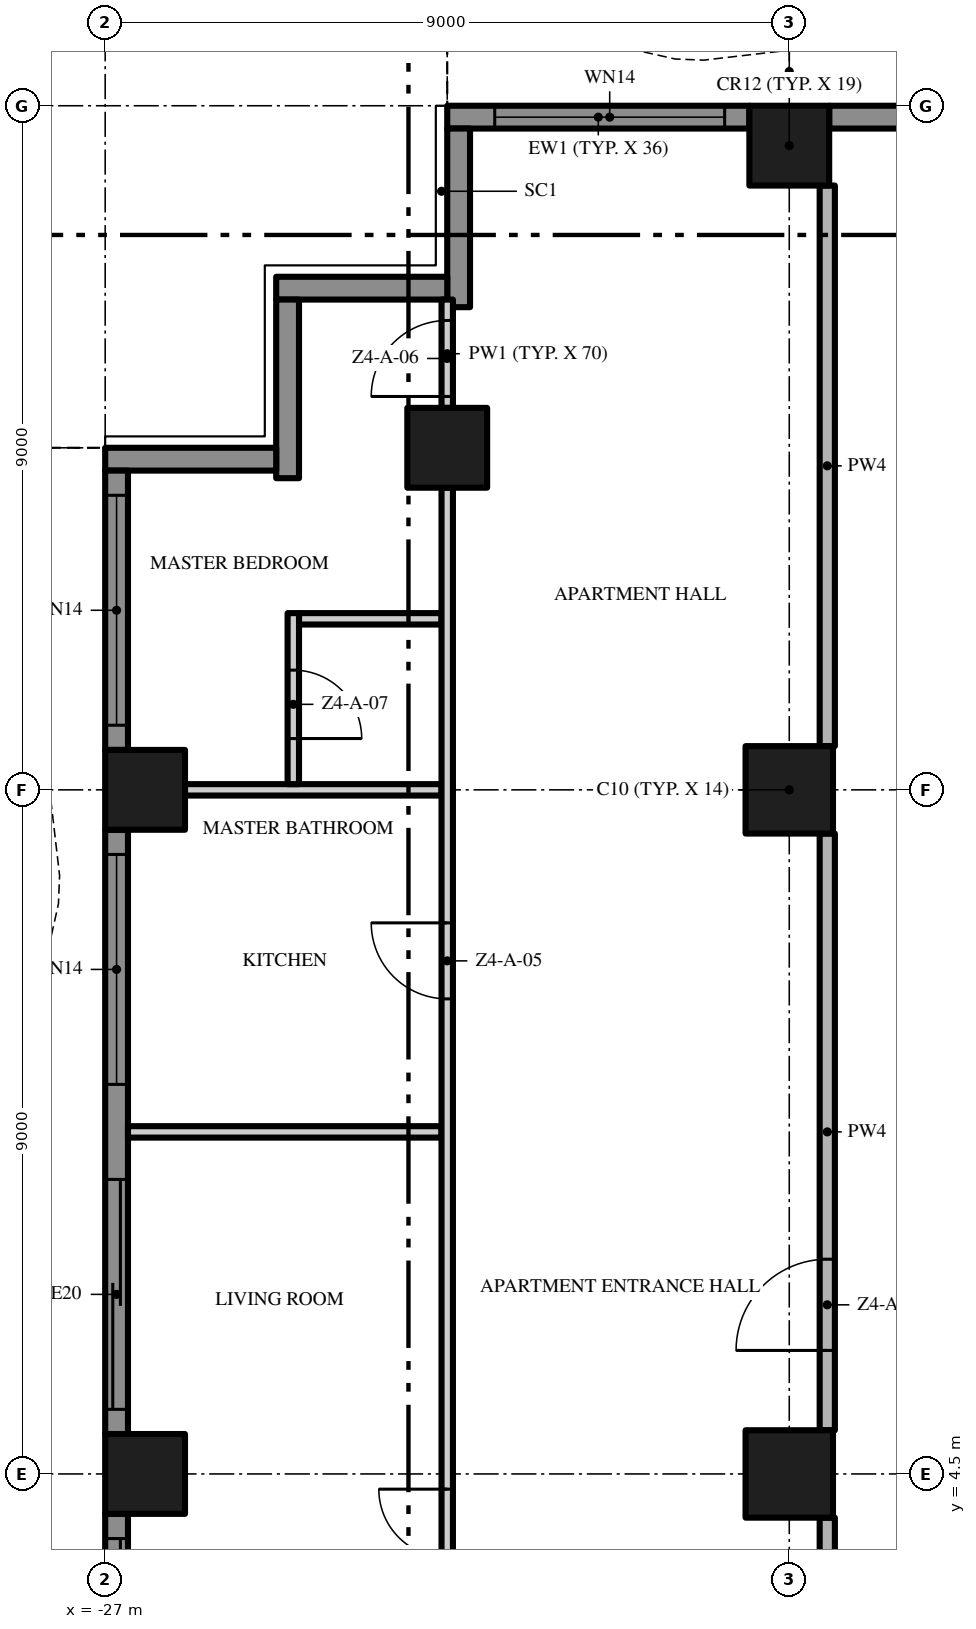
"""IFC4 building model, lengths in metres.
Left out: names, types, materials, properties, quantities, classifications, styles, units other than length and angle.
Written with IfcOpenShell. Run it as: python <this file> out.ifc"""

import sys

from ifc_helpers import new_model, si_unit, direction, frame, frame_2d, origin, origin_2d, place, context, subcontext, project, spatial, polyline, rectangle, outline, extrude, element, fill, save


model = new_model("IFC4")
c1 = context("Model", 3, precision=1e-05, world=origin(), true_north=direction((0.0, 1.0)))
c2 = subcontext(c1, "Body", "Model", "MODEL_VIEW")
j1 = project(units=[si_unit("LENGTHUNIT", "METRE"), si_unit("PLANEANGLEUNIT", "RADIAN")], contexts=[c1])
p1 = place(None, origin())
s1 = spatial("IfcSite", under=j1, at=p1, CompositionType="ELEMENT")
p2 = place(p1, origin())
s2 = spatial("IfcBuilding", under=s1, at=p2, CompositionType="ELEMENT")
p3 = place(p2, frame((0.0, 0.0, 192.0)))
s3 = spatial("IfcBuildingStorey", under=s2, at=p3, CompositionType="ELEMENT", Elevation=192.0)
p4 = place(p3, frame((-18.0, 13.5, 0.0), z_axis=(0.0, 0.0, 1.0), x_axis=(1.0, 0.0, 0.0)))
e1 = element("IfcColumn", 1, at=p4, inside=s3, PredefinedType="COLUMN", context=c2, shape_type="SweptSolid", body=[
    extrude(rectangle(XDim=1.15, YDim=1.15, at=origin_2d()), origin(), (0.0, 0.0, 1.0), 3.5),
])
p5 = place(p3, frame((-18.0, 21.975, 0.0), z_axis=(0.0, 0.0, 1.0), x_axis=(1.0, 0.0, 0.0)))
e2 = element("IfcColumn", 2, at=p5, inside=s3, PredefinedType="COLUMN", context=c2, shape_type="SweptSolid", body=[
    extrude(rectangle(XDim=1.05, YDim=1.05, at=origin_2d()), origin(), (0.0, 0.0, 1.0), 3.5),
])
p6 = place(p3, frame((-18.0, 4.5, 0.0), z_axis=(0.0, 0.0, 1.0), x_axis=(1.0, 0.0, 0.0)))
e3 = element("IfcColumn", 3, at=p6, inside=s3, PredefinedType="COLUMN", context=c2, shape_type="SweptSolid", body=[
    extrude(rectangle(XDim=1.15, YDim=1.15, at=origin_2d()), origin(), (0.0, 0.0, 1.0), 3.5),
])
for number, where, z_axis, x_axis in (
    (4, (-26.475, 13.5, 0.0), (0.0, 0.0, 1.0), (1.0, 0.0, 0.0)),
    (5, (-22.5, 18.0, 0.0), (0.0, 0.0, 1.0), (1.0, 0.0, 0.0)),
    (6, (-26.475, 4.5, 0.0), (0.0, 0.0, 1.0), (1.0, 0.0, 0.0)),
):
    element("IfcColumn", number, at=place(p3, frame(where, z_axis=z_axis, x_axis=x_axis)), inside=s3, PredefinedType="COLUMN", context=c2, shape_type="SweptSolid", body=[
        extrude(rectangle(XDim=1.05, YDim=1.05, at=origin_2d()), origin(), (0.0, 0.0, 1.0), 3.5),
    ])
p7 = place(p3, frame((-17.475, 22.35, 0.0), z_axis=(0.0, 0.0, 1.0), x_axis=(1.0, 0.0, 0.0)))
e7 = element("IfcWall", 7, at=p7, inside=s3, PredefinedType="SOLIDWALL", context=c2, shape_type="SweptSolid", body=[
    extrude(rectangle(XDim=3.975, YDim=0.3, at=frame_2d((1.988, 0.0))), origin(), (0.0, 0.0, 1.0), 3.5),
])
p8 = place(p7, frame((0.95, 0.0, 0.0)))
e8 = element("IfcOpeningElement", 8, at=p8, cuts=e7, PredefinedType="OPENING", context=c2, shape_type="SweptSolid", body=[
    extrude(rectangle(XDim=2.4, YDim=2.4, at=frame_2d((1.2, 1.2))), frame((0.0, 0.16, 0.0), z_axis=(0.0, -1.0, 0.0), x_axis=(1.0, 0.0, 0.0)), (0.0, 0.0, 1.0), 0.32),
])
p9 = place(p3, frame((-22.5, 22.35, 0.0), z_axis=(0.0, 0.0, 1.0), x_axis=(1.0, 0.0, 0.0)))
e9 = element("IfcWall", 9, at=p9, inside=s3, PredefinedType="SOLIDWALL", context=c2, shape_type="SweptSolid", body=[
    extrude(rectangle(XDim=3.975, YDim=0.3, at=frame_2d((1.988, 0.0))), origin(), (0.0, 0.0, 1.0), 3.5),
])
p10 = place(p9, frame((0.625, 0.0, 0.45)))
e10 = element("IfcOpeningElement", 10, at=p10, cuts=e9, PredefinedType="OPENING", context=c2, shape_type="SweptSolid", body=[
    extrude(rectangle(XDim=3.025, YDim=2.65, at=frame_2d((1.512, 1.325))), frame((0.0, 0.16, 0.0), z_axis=(0.0, -1.0, 0.0), x_axis=(1.0, 0.0, 0.0)), (0.0, 0.0, 1.0), 0.32),
])
p11 = place(p3, frame((-22.35, 19.85, 0.0), z_axis=(0.0, 0.0, 1.0), x_axis=(0.0, 1.0, 0.0)))
e11 = element("IfcWall", 11, at=p11, inside=s3, PredefinedType="SOLIDWALL", context=c2, shape_type="SweptSolid", body=[
    extrude(rectangle(XDim=2.35, YDim=0.3, at=frame_2d((1.175, 0.0))), origin(), (0.0, 0.0, 1.0), 3.5),
])
p12 = place(p3, frame((-24.75, 20.1, 0.0), z_axis=(0.0, 0.0, 1.0), x_axis=(1.0, 0.0, 0.0)))
e12 = element("IfcWall", 12, at=p12, inside=s3, PredefinedType="SOLIDWALL", context=c2, shape_type="SweptSolid", body=[
    extrude(rectangle(XDim=2.25, YDim=0.3, at=frame_2d((1.125, 0.0))), origin(), (0.0, 0.0, 1.0), 3.5),
])
p13 = place(p3, frame((-24.6, 17.6, 0.0), z_axis=(0.0, 0.0, 1.0), x_axis=(0.0, 1.0, 0.0)))
e13 = element("IfcWall", 13, at=p13, inside=s3, PredefinedType="SOLIDWALL", context=c2, shape_type="SweptSolid", body=[
    extrude(rectangle(XDim=2.35, YDim=0.3, at=frame_2d((1.175, 0.0))), origin(), (0.0, 0.0, 1.0), 3.5),
])
p14 = place(p3, frame((-27.0, 17.85, 0.0), z_axis=(0.0, 0.0, 1.0), x_axis=(1.0, 0.0, 0.0)))
e14 = element("IfcWall", 14, at=p14, inside=s3, PredefinedType="SOLIDWALL", context=c2, shape_type="SweptSolid", body=[
    extrude(rectangle(XDim=2.25, YDim=0.3, at=frame_2d((1.125, 0.0))), origin(), (0.0, 0.0, 1.0), 3.5),
])
p15 = place(p3, frame((-26.85, 14.025, 0.0), z_axis=(0.0, 0.0, 1.0), x_axis=(0.0, 1.0, 0.0)))
e15 = element("IfcWall", 15, at=p15, inside=s3, PredefinedType="SOLIDWALL", context=c2, shape_type="SweptSolid", body=[
    extrude(rectangle(XDim=3.675, YDim=0.3, at=frame_2d((1.837, 0.0))), origin(), (0.0, 0.0, 1.0), 3.5),
])
p16 = place(p15, frame((0.325, 0.0, 0.45)))
e16 = element("IfcOpeningElement", 16, at=p16, cuts=e15, PredefinedType="OPENING", context=c2, shape_type="SweptSolid", body=[
    extrude(rectangle(XDim=3.025, YDim=2.65, at=frame_2d((1.512, 1.325))), frame((0.0, 0.16, 0.0), z_axis=(0.0, -1.0, 0.0), x_axis=(1.0, 0.0, 0.0)), (0.0, 0.0, 1.0), 0.32),
])
p17 = place(p3, frame((-26.85, 5.025, 0.0), z_axis=(0.0, 0.0, 1.0), x_axis=(0.0, 1.0, 0.0)))
e17 = element("IfcWall", 17, at=p17, inside=s3, PredefinedType="SOLIDWALL", context=c2, shape_type="SweptSolid", body=[
    extrude(rectangle(XDim=7.95, YDim=0.3, at=frame_2d((3.975, 0.0))), origin(), (0.0, 0.0, 1.0), 3.5),
])
p18 = place(p17, frame((4.6, 0.0, 0.45)))
e18 = element("IfcOpeningElement", 18, at=p18, cuts=e17, PredefinedType="OPENING", context=c2, shape_type="SweptSolid", body=[
    extrude(rectangle(XDim=3.025, YDim=2.65, at=frame_2d((1.512, 1.325))), frame((0.0, 0.16, 0.0), z_axis=(0.0, -1.0, 0.0), x_axis=(1.0, 0.0, 0.0)), (0.0, 0.0, 1.0), 0.32),
])
p19 = place(p17, frame((0.325, 0.0, 0.0)))
e19 = element("IfcOpeningElement", 19, at=p19, cuts=e17, PredefinedType="OPENING", context=c2, shape_type="SweptSolid", body=[
    extrude(rectangle(XDim=3.025, YDim=2.4, at=frame_2d((1.512, 1.2))), frame((0.0, 0.16, 0.0), z_axis=(0.0, -1.0, 0.0), x_axis=(1.0, 0.0, 0.0)), (0.0, 0.0, 1.0), 0.32),
])
p20 = place(p3, frame((-26.85, -3.975, 0.0), z_axis=(0.0, 0.0, 1.0), x_axis=(0.0, 1.0, 0.0)))
e20 = element("IfcWall", 20, at=p20, inside=s3, PredefinedType="SOLIDWALL", context=c2, shape_type="SweptSolid", body=[
    extrude(rectangle(XDim=7.95, YDim=0.3, at=frame_2d((3.975, 0.0))), origin(), (0.0, 0.0, 1.0), 3.5),
])
p21 = place(p20, frame((4.6, 0.0, 0.0)))
e21 = element("IfcOpeningElement", 21, at=p21, cuts=e20, PredefinedType="OPENING", context=c2, shape_type="SweptSolid", body=[
    extrude(rectangle(XDim=3.025, YDim=2.4, at=frame_2d((1.512, 1.2))), frame((0.0, 0.16, 0.0), z_axis=(0.0, -1.0, 0.0), x_axis=(1.0, 0.0, 0.0)), (0.0, 0.0, 1.0), 0.32),
])
p22 = place(p20, frame((0.325, 0.0, 0.45)))
e22 = element("IfcOpeningElement", 22, at=p22, cuts=e20, PredefinedType="OPENING", context=c2, shape_type="SweptSolid", body=[
    extrude(rectangle(XDim=3.025, YDim=2.65, at=frame_2d((1.512, 1.325))), frame((0.0, 0.16, 0.0), z_axis=(0.0, -1.0, 0.0), x_axis=(1.0, 0.0, 0.0)), (0.0, 0.0, 1.0), 0.32),
])
p23 = place(p3, origin())
e23 = element("IfcWall", 23, at=p23, inside=s3, PredefinedType="USERDEFINED", context=c2, shape_type="SweptSolid", body=[
    extrude(outline(polyline([(-13.5, 25.149), (-15.0, 24.488), (-16.5, 23.755), (-18.0, 23.231), (-19.125, 23.1), (-19.5, 23.115), (-21.0, 23.451), (-22.5, 24.112), (-22.601, 23.883), (-21.079, 23.213), (-19.533, 22.866), (-19.115, 22.849), (-17.944, 22.986), (-16.404, 23.524), (-14.895, 24.261), (-13.399, 24.92), (-13.5, 25.149)])), origin(), (0.0, 0.0, 1.0), 0.9),
])
p24 = place(p3, origin())
e24 = element("IfcWall", 24, at=p24, inside=s3, PredefinedType="USERDEFINED", context=c2, shape_type="SweptSolid", body=[
    extrude(outline(polyline([(-29.649, 18.0), (-28.988, 16.5), (-28.255, 15.0), (-27.731, 13.5), (-27.6, 12.375), (-27.615, 12.0), (-27.951, 10.5), (-28.612, 9.0), (-29.345, 7.5), (-29.869, 6.0), (-30.0, 4.875), (-29.985, 4.5), (-29.649, 3.0), (-28.988, 1.5), (-28.255, 0.0), (-27.731, -1.5), (-27.6, -2.625), (-27.615, -3.0), (-27.951, -4.5), (-28.612, -6.0), (-29.345, -7.5), (-29.869, -9.0), (-30.0, -10.125), (-29.985, -10.5), (-29.649, -12.0), (-28.988, -13.5), (-28.255, -15.0), (-27.731, -16.5), (-27.6, -17.625), (-27.615, -18.0), (-27.365, -18.01), (-27.349, -17.615), (-27.486, -16.444), (-28.024, -14.904), (-28.761, -13.395), (-29.41, -11.921), (-29.736, -10.467), (-29.749, -10.135), (-29.624, -9.056), (-29.114, -7.596), (-28.385, -6.105), (-27.713, -4.579), (-27.366, -3.033), (-27.349, -2.615), (-27.486, -1.444), (-28.024, 0.096), (-28.761, 1.605), (-29.41, 3.079), (-29.736, 4.533), (-29.749, 4.865), (-29.624, 5.944), (-29.114, 7.404), (-28.385, 8.895), (-27.713, 10.421), (-27.366, 11.967), (-27.349, 12.385), (-27.486, 13.556), (-28.024, 15.096), (-28.761, 16.605), (-29.42, 18.101), (-29.649, 18.0)])), origin(), (0.0, 0.0, 1.0), 0.9),
])
p25 = place(p3, frame((-26.7, 9.0, 0.0), z_axis=(0.0, 0.0, 1.0), x_axis=(1.0, 0.0, 0.0)))
e25 = element("IfcWall", 25, at=p25, inside=s3, PredefinedType="PARTITIONING", context=c2, shape_type="SweptSolid", body=[
    extrude(rectangle(XDim=4.125, YDim=0.15, at=frame_2d((2.062, 0.0))), origin(), (0.0, 0.0, 1.0), 3.5),
])
p26 = place(p3, frame((-25.95, 13.5, 0.0), z_axis=(0.0, 0.0, 1.0), x_axis=(1.0, 0.0, 0.0)))
e26 = element("IfcWall", 26, at=p26, inside=s3, PredefinedType="PARTITIONING", context=c2, shape_type="SweptSolid", body=[
    extrude(rectangle(XDim=3.375, YDim=0.15, at=frame_2d((1.688, 0.0))), origin(), (0.0, 0.0, 1.0), 3.5),
])
p27 = place(p3, frame((-24.45, 15.75, 0.0), z_axis=(0.0, 0.0, 1.0), x_axis=(1.0, 0.0, 0.0)))
e27 = element("IfcWall", 27, at=p27, inside=s3, PredefinedType="PARTITIONING", context=c2, shape_type="SweptSolid", body=[
    extrude(rectangle(XDim=1.875, YDim=0.15, at=frame_2d((0.938, 0.0))), origin(), (0.0, 0.0, 1.0), 3.5),
])
p28 = place(p3, frame((-24.525, 15.825, 0.0), z_axis=(0.0, 0.0, 1.0), x_axis=(0.0, -1.0, 0.0)))
e28 = element("IfcWall", 28, at=p28, inside=s3, PredefinedType="PARTITIONING", context=c2, shape_type="SweptSolid", body=[
    extrude(rectangle(XDim=2.25, YDim=0.15, at=frame_2d((1.125, 0.0))), origin(), (0.0, 0.0, 1.0), 3.5),
])
p29 = place(p28, frame((0.75, 0.0, 0.0)))
e29 = element("IfcOpeningElement", 29, at=p29, cuts=e28, PredefinedType="OPENING", context=c2, shape_type="SweptSolid", body=[
    extrude(rectangle(XDim=0.9, YDim=2.1, at=frame_2d((0.45, 1.05))), frame((0.0, 0.085, 0.0), z_axis=(0.0, -1.0, 0.0), x_axis=(1.0, 0.0, 0.0)), (0.0, 0.0, 1.0), 0.17),
])
p30 = place(p3, frame((-22.5, 0.1, 0.0), z_axis=(0.0, 0.0, 1.0), x_axis=(0.0, 1.0, 0.0)))
e30 = element("IfcWall", 30, at=p30, inside=s3, PredefinedType="PARTITIONING", context=c2, shape_type="SweptSolid", body=[
    extrude(rectangle(XDim=17.375, YDim=0.15, at=frame_2d((8.688, 0.0))), origin(), (0.0, 0.0, 1.0), 3.5),
])
p31 = place(p30, frame((2.4, 0.0, 0.0)))
e31 = element("IfcOpeningElement", 31, at=p31, cuts=e30, PredefinedType="OPENING", context=c2, shape_type="SweptSolid", body=[
    extrude(rectangle(XDim=1.8, YDim=2.4, at=frame_2d((0.9, 1.2))), frame((0.0, 0.085, 0.0), z_axis=(0.0, -1.0, 0.0), x_axis=(1.0, 0.0, 0.0)), (0.0, 0.0, 1.0), 0.17),
])
p32 = place(p30, frame((10.65, 0.0, 0.0)))
e32 = element("IfcOpeningElement", 32, at=p32, cuts=e30, PredefinedType="OPENING", context=c2, shape_type="SweptSolid", body=[
    extrude(rectangle(XDim=1.0, YDim=2.4, at=frame_2d((0.5, 1.2))), frame((0.0, 0.085, 0.0), z_axis=(0.0, -1.0, 0.0), x_axis=(1.0, 0.0, 0.0)), (0.0, 0.0, 1.0), 0.17),
])
p33 = place(p3, frame((-22.5, 18.525, 0.0), z_axis=(0.0, 0.0, 1.0), x_axis=(0.0, 1.0, 0.0)))
e33 = element("IfcWall", 33, at=p33, inside=s3, PredefinedType="PARTITIONING", context=c2, shape_type="SweptSolid", body=[
    extrude(rectangle(XDim=1.425, YDim=0.15, at=frame_2d((0.713, 0.0))), origin(), (0.0, 0.0, 1.0), 3.5),
])
p34 = place(p33, frame((0.15, 0.0, 0.0)))
e34 = element("IfcOpeningElement", 34, at=p34, cuts=e33, PredefinedType="OPENING", context=c2, shape_type="SweptSolid", body=[
    extrude(rectangle(XDim=1.0, YDim=2.4, at=frame_2d((0.5, 1.2))), frame((0.0, 0.085, 0.0), z_axis=(0.0, -1.0, 0.0), x_axis=(1.0, 0.0, 0.0)), (0.0, 0.0, 1.0), 0.17),
])
p35 = place(p3, frame((-17.5, -0.2, 0.0), z_axis=(0.0, 0.0, 1.0), x_axis=(0.0, 1.0, 0.0)))
e35 = element("IfcWall", 35, at=p35, inside=s3, PredefinedType="PARTITIONING", context=c2, shape_type="SweptSolid", body=[
    extrude(rectangle(XDim=4.125, YDim=0.2, at=frame_2d((2.062, 0.0))), origin(), (0.0, 0.0, 1.0), 3.5),
])
p36 = place(p3, frame((-17.5, 5.075, 0.0), z_axis=(0.0, 0.0, 1.0), x_axis=(0.0, 1.0, 0.0)))
e36 = element("IfcWall", 36, at=p36, inside=s3, PredefinedType="PARTITIONING", context=c2, shape_type="SweptSolid", body=[
    extrude(rectangle(XDim=7.85, YDim=0.2, at=frame_2d((3.925, 0.0))), origin(), (0.0, 0.0, 1.0), 3.5),
])
p37 = place(p36, frame((1.05, 0.0, 0.0)))
e37 = element("IfcOpeningElement", 37, at=p37, cuts=e36, PredefinedType="OPENING", context=c2, shape_type="SweptSolid", body=[
    extrude(rectangle(XDim=1.2, YDim=2.4, at=frame_2d((0.6, 1.2))), frame((0.0, 0.11, 0.0), z_axis=(0.0, -1.0, 0.0), x_axis=(1.0, 0.0, 0.0)), (0.0, 0.0, 1.0), 0.22),
])
p38 = place(p3, frame((-17.5, 14.075, 0.0), z_axis=(0.0, 0.0, 1.0), x_axis=(0.0, 1.0, 0.0)))
e38 = element("IfcWall", 38, at=p38, inside=s3, PredefinedType="PARTITIONING", context=c2, shape_type="SweptSolid", body=[
    extrude(rectangle(XDim=7.375, YDim=0.2, at=frame_2d((3.688, 0.0))), origin(), (0.0, 0.0, 1.0), 3.5),
])
p39 = place(p10, origin())
e39 = element("IfcWindow", 39, at=p39, inside=s3, PartitioningType="SINGLE_PANEL", PredefinedType="WINDOW", context=c2, shape_type="SweptSolid", body=[
    extrude(rectangle(XDim=3.025, YDim=2.65, at=frame_2d((1.512, 1.325))), frame((0.0, 0.03, 0.0), z_axis=(0.0, -1.0, 0.0), x_axis=(1.0, 0.0, 0.0)), (0.0, 0.0, 1.0), 0.06),
])
fill(e10, e39)
p40 = place(p16, origin())
e40 = element("IfcWindow", 40, at=p40, inside=s3, PartitioningType="SINGLE_PANEL", PredefinedType="WINDOW", context=c2, shape_type="SweptSolid", body=[
    extrude(rectangle(XDim=3.025, YDim=2.65, at=frame_2d((1.512, 1.325))), frame((0.0, 0.03, 0.0), z_axis=(0.0, -1.0, 0.0), x_axis=(1.0, 0.0, 0.0)), (0.0, 0.0, 1.0), 0.06),
])
fill(e16, e40)
p41 = place(p18, origin())
e41 = element("IfcWindow", 41, at=p41, inside=s3, PartitioningType="SINGLE_PANEL", PredefinedType="WINDOW", context=c2, shape_type="SweptSolid", body=[
    extrude(rectangle(XDim=3.025, YDim=2.65, at=frame_2d((1.512, 1.325))), frame((0.0, 0.03, 0.0), z_axis=(0.0, -1.0, 0.0), x_axis=(1.0, 0.0, 0.0)), (0.0, 0.0, 1.0), 0.06),
])
fill(e18, e41)
p42 = place(p19, origin())
e42 = element("IfcDoor", 42, at=p42, inside=s3, OperationType="SINGLE_SWING_LEFT", PredefinedType="DOOR", context=c2, shape_type="SweptSolid", body=[
    extrude(rectangle(XDim=3.025, YDim=2.4, at=frame_2d((1.512, 1.2))), frame((0.0, 0.025, 0.0), z_axis=(0.0, -1.0, 0.0), x_axis=(1.0, 0.0, 0.0)), (0.0, 0.0, 1.0), 0.05),
])
fill(e19, e42)
p43 = place(p21, origin())
e43 = element("IfcDoor", 43, at=p43, inside=s3, OperationType="SINGLE_SWING_LEFT", PredefinedType="DOOR", context=c2, shape_type="SweptSolid", body=[
    extrude(rectangle(XDim=3.025, YDim=2.4, at=frame_2d((1.512, 1.2))), frame((0.0, 0.025, 0.0), z_axis=(0.0, -1.0, 0.0), x_axis=(1.0, 0.0, 0.0)), (0.0, 0.0, 1.0), 0.05),
])
fill(e21, e43)
p44 = place(p37, origin())
e44 = element("IfcDoor", 44, at=p44, inside=s3, OperationType="SINGLE_SWING_LEFT", PredefinedType="DOOR", context=c2, shape_type="SweptSolid", body=[
    extrude(rectangle(XDim=1.2, YDim=2.4, at=frame_2d((0.6, 1.2))), frame((0.0, 0.025, 0.0), z_axis=(0.0, -1.0, 0.0), x_axis=(1.0, 0.0, 0.0)), (0.0, 0.0, 1.0), 0.05),
])
fill(e37, e44)
p45 = place(p31, origin())
e45 = element("IfcDoor", 45, at=p45, inside=s3, OperationType="DOUBLE_DOOR_SINGLE_SWING", PredefinedType="DOOR", context=c2, shape_type="SweptSolid", body=[
    extrude(rectangle(XDim=1.8, YDim=2.4, at=frame_2d((0.9, 1.2))), frame((0.0, 0.025, 0.0), z_axis=(0.0, -1.0, 0.0), x_axis=(1.0, 0.0, 0.0)), (0.0, 0.0, 1.0), 0.05),
])
fill(e31, e45)
p46 = place(p32, origin())
e46 = element("IfcDoor", 46, at=p46, inside=s3, OperationType="SINGLE_SWING_RIGHT", PredefinedType="DOOR", context=c2, shape_type="SweptSolid", body=[
    extrude(rectangle(XDim=1.0, YDim=2.4, at=frame_2d((0.5, 1.2))), frame((0.0, 0.025, 0.0), z_axis=(0.0, -1.0, 0.0), x_axis=(1.0, 0.0, 0.0)), (0.0, 0.0, 1.0), 0.05),
])
fill(e32, e46)
p47 = place(p34, origin())
e47 = element("IfcDoor", 47, at=p47, inside=s3, OperationType="SINGLE_SWING_LEFT", PredefinedType="DOOR", context=c2, shape_type="SweptSolid", body=[
    extrude(rectangle(XDim=1.0, YDim=2.4, at=frame_2d((0.5, 1.2))), frame((0.0, 0.025, 0.0), z_axis=(0.0, -1.0, 0.0), x_axis=(1.0, 0.0, 0.0)), (0.0, 0.0, 1.0), 0.05),
])
fill(e34, e47)
p48 = place(p29, origin())
e48 = element("IfcDoor", 48, at=p48, inside=s3, OperationType="SINGLE_SWING_RIGHT", PredefinedType="DOOR", context=c2, shape_type="SweptSolid", body=[
    extrude(rectangle(XDim=0.9, YDim=2.1, at=frame_2d((0.45, 1.05))), frame((0.0, 0.025, 0.0), z_axis=(0.0, -1.0, 0.0), x_axis=(1.0, 0.0, 0.0)), (0.0, 0.0, 1.0), 0.05),
])
fill(e29, e48)
save(model, sys.argv[1])
